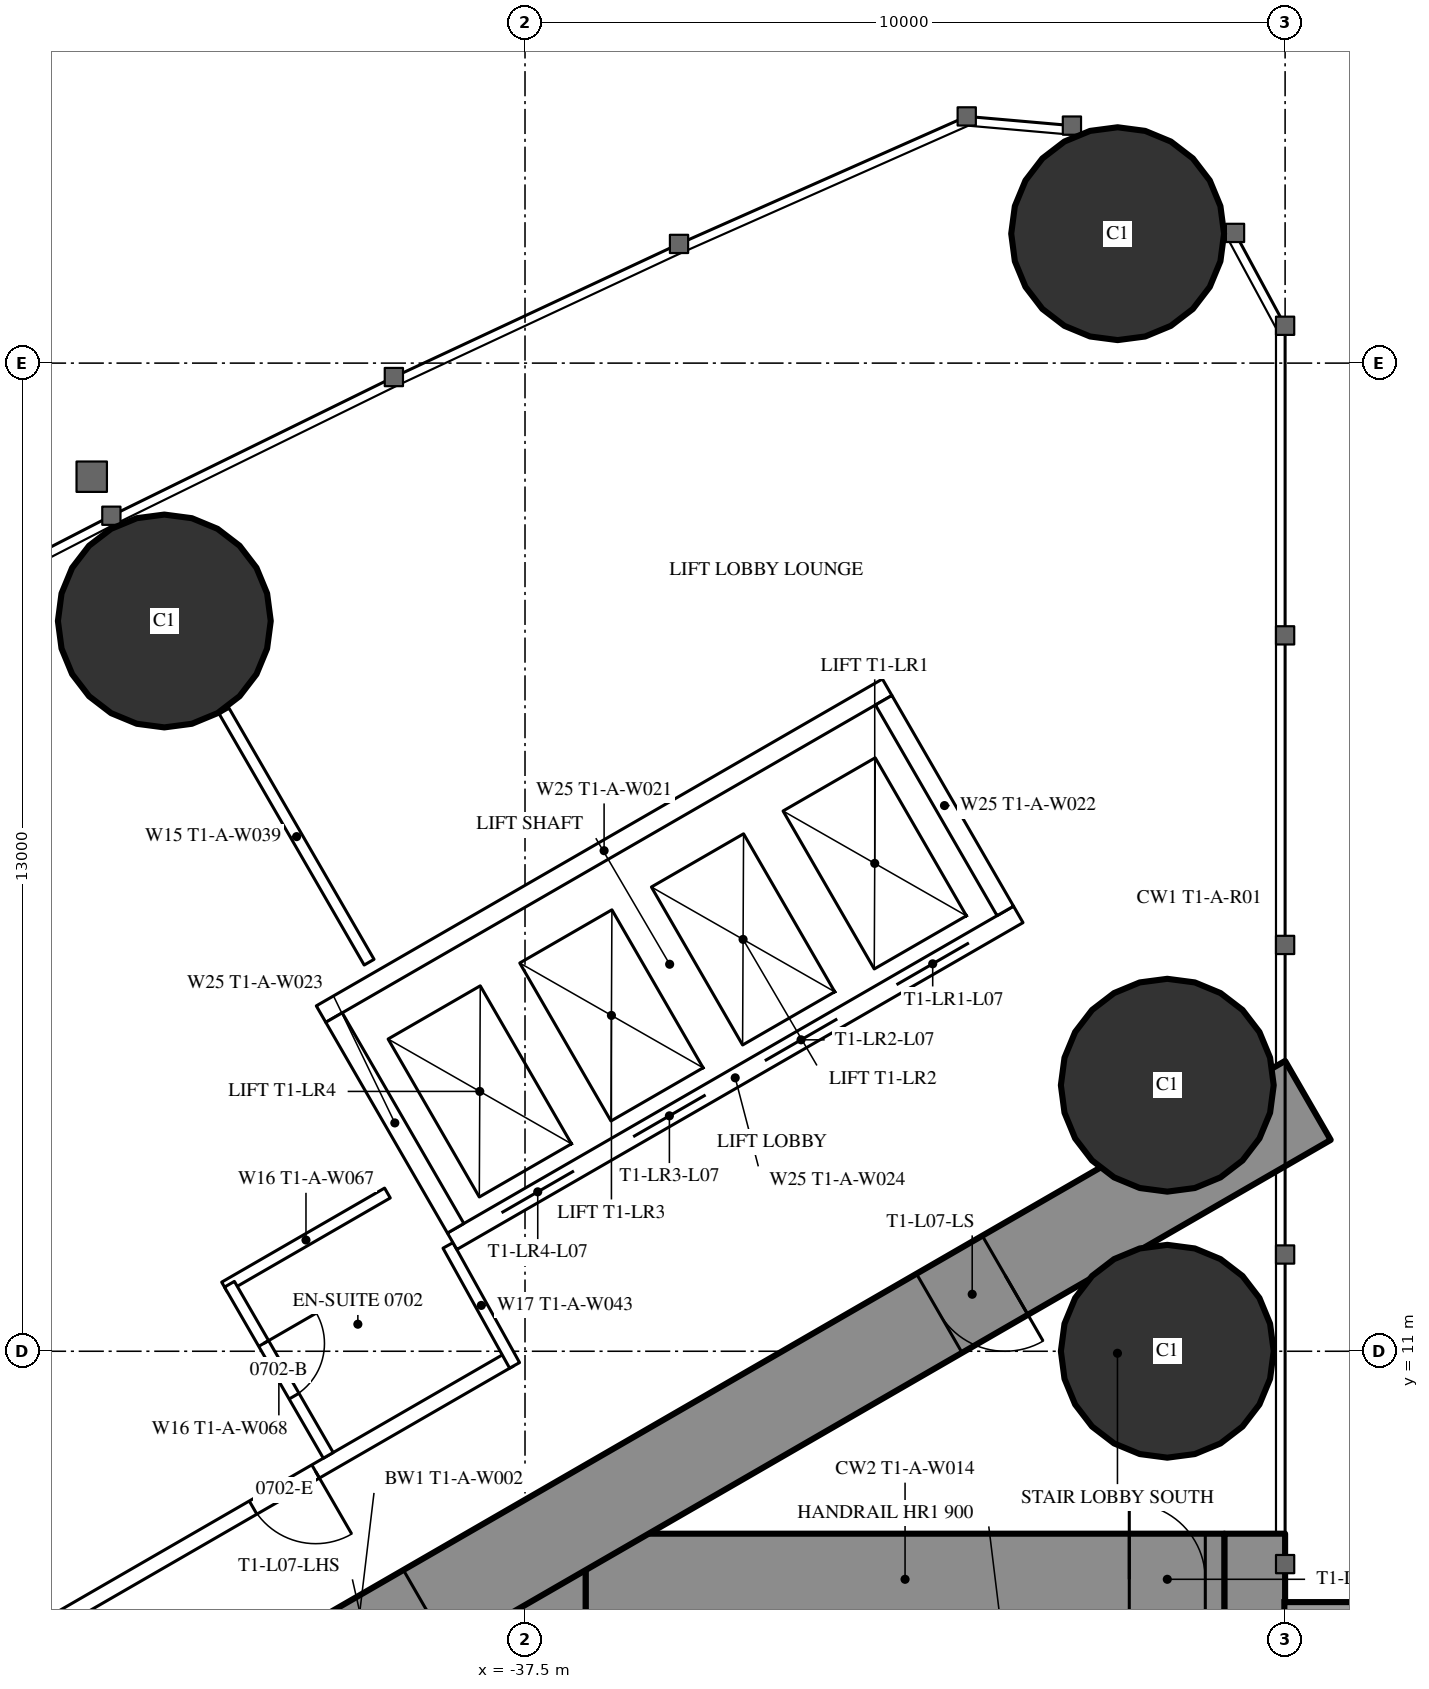
"""IFC4 building model, lengths in metres.
Left out: names, types, materials, properties, quantities, classifications, styles, units other than length and angle.
Written with IfcOpenShell. Run it as: python <this file> out.ifc"""

import sys

from ifc_helpers import new_model, si_unit, direction, frame, frame_2d, origin, origin_2d, place, context, subcontext, project, spatial, rectangle, hollow_circle, extrude, element, fill, save


model = new_model("IFC4")
c1 = context("Model", 3, precision=1e-05, world=origin(), true_north=direction((0.0, 1.0)))
c2 = subcontext(c1, "Body", "Model", "MODEL_VIEW")
j1 = project(units=[si_unit("LENGTHUNIT", "METRE"), si_unit("PLANEANGLEUNIT", "RADIAN")], contexts=[c1])
p1 = place(None, origin())
s1 = spatial("IfcSite", under=j1, at=p1, CompositionType="ELEMENT")
p2 = place(p1, origin())
s2 = spatial("IfcBuilding", under=s1, at=p2, CompositionType="ELEMENT")
p3 = place(p2, frame((0.0, 0.0, 32.0)))
s3 = spatial("IfcBuildingStorey", under=s2, at=p3, CompositionType="ELEMENT", Elevation=32.0)
for number, where, z_axis, x_axis in (
    (1, (-29.703, 25.703, 0.0), (0.0, 0.0, 1.0), (1.0, 0.0, 0.0)),
    (2, (-29.05, 11.0, 0.0), (0.0, 0.0, 1.0), (1.0, 0.0, 0.0)),
    (3, (-29.05, 14.5, 0.0), (0.0, 0.0, 1.0), (1.0, 0.0, 0.0)),
    (4, (-42.245, 20.607, 0.0), (0.0, 0.0, 1.0), (1.0, 0.0, 0.0)),
):
    element("IfcColumn", number, at=place(p3, frame(where, z_axis=z_axis, x_axis=x_axis)), inside=s3, PredefinedType="COLUMN", context=c2, shape_type="SweptSolid", body=[
        extrude(hollow_circle(Radius=1.4, WallThickness=0.12, at=origin_2d()), origin(), (0.0, 0.0, 1.0), 3.5),
    ])
p4 = place(p3, frame((-27.9, 8.6, 0.0), z_axis=(0.0, 0.0, 1.0), x_axis=(0.0, -1.0, 0.0)))
e5 = element("IfcWall", 5, at=p4, inside=s3, PredefinedType="SHEAR", context=c2, shape_type="SweptSolid", body=[
    extrude(rectangle(XDim=17.2, YDim=0.8, at=frame_2d((8.6, 0.0))), origin(), (0.0, 0.0, 1.0), 3.5),
])
p5 = place(p4, frame((2.45, 0.0, 0.6)))
e6 = element("IfcOpeningElement", 6, at=p5, cuts=e5, PredefinedType="OPENING", context=c2, shape_type="SweptSolid", body=[
    extrude(rectangle(XDim=0.6, YDim=2.1, at=frame_2d((0.3, 1.05))), frame((0.0, 0.41, 0.0), z_axis=(0.0, -1.0, 0.0), x_axis=(1.0, 0.0, 0.0)), (0.0, 0.0, 1.0), 0.82),
])
p6 = place(p4, frame((14.15, 0.0, 0.6)))
e7 = element("IfcOpeningElement", 7, at=p6, cuts=e5, PredefinedType="OPENING", context=c2, shape_type="SweptSolid", body=[
    extrude(rectangle(XDim=0.6, YDim=2.1, at=frame_2d((0.3, 1.05))), frame((0.0, 0.41, 0.0), z_axis=(0.0, -1.0, 0.0), x_axis=(1.0, 0.0, 0.0)), (0.0, 0.0, 1.0), 0.82),
])
p7 = place(p3, frame((-37.3, 8.6, 0.0), z_axis=(0.0, 0.0, 1.0), x_axis=(0.0, -1.0, 0.0)))
e8 = element("IfcWall", 8, at=p7, inside=s3, PredefinedType="SHEAR", context=c2, shape_type="SweptSolid", body=[
    extrude(rectangle(XDim=17.2, YDim=1.2, at=frame_2d((8.6, 0.0))), origin(), (0.0, 0.0, 1.0), 3.5),
])
p8 = place(p7, frame((7.7, 0.0, 0.0)))
e9 = element("IfcOpeningElement", 9, at=p8, cuts=e8, PredefinedType="OPENING", context=c2, shape_type="SweptSolid", body=[
    extrude(rectangle(XDim=1.8, YDim=2.2, at=frame_2d((0.9, 1.1))), frame((0.0, 0.61, 0.0), z_axis=(0.0, -1.0, 0.0), x_axis=(1.0, 0.0, 0.0)), (0.0, 0.0, 1.0), 1.22),
])
p9 = place(p3, frame((-28.3, 8.0, 0.0), z_axis=(0.0, 0.0, 1.0), x_axis=(-1.0, 0.0, 0.0)))
e10 = element("IfcWall", 10, at=p9, inside=s3, PredefinedType="SHEAR", context=c2, shape_type="SweptSolid", body=[
    extrude(rectangle(XDim=8.4, YDim=1.2, at=frame_2d((4.2, 0.0))), origin(), (0.0, 0.0, 1.0), 3.5),
])
p10 = place(p9, frame((0.25, 0.0, 0.0)))
e11 = element("IfcOpeningElement", 11, at=p10, cuts=e10, PredefinedType="OPENING", context=c2, shape_type="SweptSolid", body=[
    extrude(rectangle(XDim=1.0, YDim=2.2, at=frame_2d((0.5, 1.1))), frame((0.0, 0.61, 0.0), z_axis=(0.0, -1.0, 0.0), x_axis=(1.0, 0.0, 0.0)), (0.0, 0.0, 1.0), 1.22),
])
p11 = place(p3, frame((-27.2, 14.3, 0.0), z_axis=(0.0, 0.0, 1.0), x_axis=(-0.866026593062, -0.499997940104, 0.0)))
e12 = element("IfcWall", 12, at=p11, inside=s3, PredefinedType="SHEAR", context=c2, shape_type="SweptSolid", body=[
    extrude(rectangle(XDim=28.946, YDim=1.2, at=frame_2d((14.473, 0.0))), origin(), (0.0, 0.0, 1.0), 3.5),
])
p12 = place(p11, frame((4.6, 0.0, 0.0)))
e13 = element("IfcOpeningElement", 13, at=p12, cuts=e12, PredefinedType="OPENING", context=c2, shape_type="SweptSolid", body=[
    extrude(rectangle(XDim=1.0, YDim=2.2, at=frame_2d((0.5, 1.1))), frame((0.0, 0.61, 0.0), z_axis=(0.0, -1.0, 0.0), x_axis=(1.0, 0.0, 0.0)), (0.0, 0.0, 1.0), 1.22),
])
p13 = place(p11, frame((13.395, 0.0, 0.0)))
e14 = element("IfcOpeningElement", 14, at=p13, cuts=e12, PredefinedType="OPENING", context=c2, shape_type="SweptSolid", body=[
    extrude(rectangle(XDim=1.8, YDim=2.2, at=frame_2d((0.9, 1.1))), frame((0.0, 0.61, 0.0), z_axis=(0.0, -1.0, 0.0), x_axis=(1.0, 0.0, 0.0)), (0.0, 0.0, 1.0), 1.22),
])
p14 = place(p3, frame((-39.551, 16.119, 0.0), z_axis=(0.0, 0.0, 1.0), x_axis=(-0.500014214979, 0.866017196607, 0.0)))
e15 = element("IfcWall", 15, at=p14, inside=s3, PredefinedType="PARTITIONING", context=c2, shape_type="SweptSolid", body=[
    extrude(rectangle(XDim=3.815, YDim=0.15, at=frame_2d((1.907, 0.0))), origin(), (0.0, 0.0, 1.0), 3.25),
])
p15 = place(p3, frame((-37.7, 10.894, 0.0), z_axis=(0.0, 0.0, 1.0), x_axis=(-0.866027905338, -0.499995667157, 0.0)))
e16 = element("IfcWall", 16, at=p15, inside=s3, PredefinedType="PARTITIONING", context=c2, shape_type="SweptSolid", body=[
    extrude(rectangle(XDim=21.787, YDim=0.2, at=frame_2d((10.894, 0.0))), origin(), (0.0, 0.0, 1.0), 3.25),
])
p16 = place(p15, frame((16.008, 0.0, 0.0)))
e17 = element("IfcOpeningElement", 17, at=p16, cuts=e16, PredefinedType="OPENING", context=c2, shape_type="SweptSolid", body=[
    extrude(rectangle(XDim=0.95, YDim=2.2, at=frame_2d((0.475, 1.1))), frame((0.0, 0.11, 0.0), z_axis=(0.0, -1.0, 0.0), x_axis=(1.0, 0.0, 0.0)), (0.0, 0.0, 1.0), 0.22),
])
p17 = place(p15, frame((20.058, 0.0, 0.0)))
e18 = element("IfcOpeningElement", 18, at=p17, cuts=e16, PredefinedType="OPENING", context=c2, shape_type="SweptSolid", body=[
    extrude(rectangle(XDim=0.95, YDim=2.2, at=frame_2d((0.475, 1.1))), frame((0.0, 0.11, 0.0), z_axis=(0.0, -1.0, 0.0), x_axis=(1.0, 0.0, 0.0)), (0.0, 0.0, 1.0), 0.22),
])
p18 = place(p15, frame((2.95, 0.0, 0.0)))
e19 = element("IfcOpeningElement", 19, at=p18, cuts=e16, PredefinedType="OPENING", context=c2, shape_type="SweptSolid", body=[
    extrude(rectangle(XDim=0.95, YDim=2.2, at=frame_2d((0.475, 1.1))), frame((0.0, 0.11, 0.0), z_axis=(0.0, -1.0, 0.0), x_axis=(1.0, 0.0, 0.0)), (0.0, 0.0, 1.0), 0.22),
])
p19 = place(p3, frame((-38.513, 12.392, 0.0), z_axis=(0.0, 0.0, 1.0), x_axis=(0.485585508183, -0.874189175317, 0.0)))
e20 = element("IfcWall", 20, at=p19, inside=s3, PredefinedType="PARTITIONING", context=c2, shape_type="SweptSolid", body=[
    extrude(rectangle(XDim=1.805, YDim=0.15, at=frame_2d((0.902, 0.0))), origin(), (0.0, 0.0, 1.0), 3.25),
])
p20 = place(p3, frame((-39.31, 13.082, 0.0), z_axis=(0.0, 0.0, 1.0), x_axis=(-0.866031185235, -0.4999899861, 0.0)))
e21 = element("IfcWall", 21, at=p20, inside=s3, PredefinedType="PARTITIONING", context=c2, shape_type="SweptSolid", body=[
    extrude(rectangle(XDim=2.475, YDim=0.15, at=frame_2d((1.238, 0.0))), origin(), (0.0, 0.0, 1.0), 3.25),
])
p21 = place(p3, frame((-40.088, 9.63, 0.0), z_axis=(0.0, 0.0, 1.0), x_axis=(-0.500006934395, 0.866021400173, 0.0)))
e22 = element("IfcWall", 22, at=p21, inside=s3, PredefinedType="PARTITIONING", context=c2, shape_type="SweptSolid", body=[
    extrude(rectangle(XDim=2.6, YDim=0.15, at=frame_2d((1.3, 0.0))), origin(), (0.0, 0.0, 1.0), 3.25),
])
p22 = place(p21, frame((0.9, 0.0, 0.0)))
e23 = element("IfcOpeningElement", 23, at=p22, cuts=e22, PredefinedType="OPENING", context=c2, shape_type="SweptSolid", body=[
    extrude(rectangle(XDim=0.8, YDim=2.2, at=frame_2d((0.4, 1.1))), frame((0.0, 0.085, 0.0), z_axis=(0.0, -1.0, 0.0), x_axis=(1.0, 0.0, 0.0)), (0.0, 0.0, 1.0), 0.17),
])
p23 = place(p3, frame((-31.01, 16.747, 0.0), z_axis=(0.0, 0.0, 1.0), x_axis=(-0.866028165386, -0.499995216735, 0.0)))
e24 = element("IfcWall", 24, at=p23, inside=s3, PredefinedType="PARTITIONING", context=c2, shape_type="SweptSolid", body=[
    extrude(rectangle(XDim=8.6, YDim=0.25, at=frame_2d((4.3, 0.0))), origin(), (0.0, 0.0, 1.0), 3.25),
])
p24 = place(p23, frame((0.75, 0.0, 0.0)))
e25 = element("IfcOpeningElement", 25, at=p24, cuts=e24, PredefinedType="OPENING", context=c2, shape_type="SweptSolid", body=[
    extrude(rectangle(XDim=1.1, YDim=2.2, at=frame_2d((0.55, 1.1))), frame((0.0, 0.135, 0.0), z_axis=(0.0, -1.0, 0.0), x_axis=(1.0, 0.0, 0.0)), (0.0, 0.0, 1.0), 0.27),
])
p25 = place(p23, frame((2.75, 0.0, 0.0)))
e26 = element("IfcOpeningElement", 26, at=p25, cuts=e24, PredefinedType="OPENING", context=c2, shape_type="SweptSolid", body=[
    extrude(rectangle(XDim=1.1, YDim=2.2, at=frame_2d((0.55, 1.1))), frame((0.0, 0.135, 0.0), z_axis=(0.0, -1.0, 0.0), x_axis=(1.0, 0.0, 0.0)), (0.0, 0.0, 1.0), 0.27),
])
p26 = place(p23, frame((4.75, 0.0, 0.0)))
e27 = element("IfcOpeningElement", 27, at=p26, cuts=e24, PredefinedType="OPENING", context=c2, shape_type="SweptSolid", body=[
    extrude(rectangle(XDim=1.1, YDim=2.2, at=frame_2d((0.55, 1.1))), frame((0.0, 0.135, 0.0), z_axis=(0.0, -1.0, 0.0), x_axis=(1.0, 0.0, 0.0)), (0.0, 0.0, 1.0), 0.27),
])
p27 = place(p23, frame((6.75, 0.0, 0.0)))
e28 = element("IfcOpeningElement", 28, at=p27, cuts=e24, PredefinedType="OPENING", context=c2, shape_type="SweptSolid", body=[
    extrude(rectangle(XDim=1.1, YDim=2.2, at=frame_2d((0.55, 1.1))), frame((0.0, 0.135, 0.0), z_axis=(0.0, -1.0, 0.0), x_axis=(1.0, 0.0, 0.0)), (0.0, 0.0, 1.0), 0.27),
])
p28 = place(p3, frame((-32.736, 19.736, 0.0), z_axis=(0.0, 0.0, 1.0), x_axis=(-0.866028165386, -0.499995216735, 0.0)))
e29 = element("IfcWall", 29, at=p28, inside=s3, PredefinedType="PARTITIONING", context=c2, shape_type="SweptSolid", body=[
    extrude(rectangle(XDim=8.6, YDim=0.25, at=frame_2d((4.3, 0.0))), origin(), (0.0, 0.0, 1.0), 3.25),
])
p29 = place(p3, frame((-31.181, 16.793, 0.0), z_axis=(0.0, 0.0, 1.0), x_axis=(-0.499929347863, 0.866066190972, 0.0)))
e30 = element("IfcWall", 30, at=p29, inside=s3, PredefinedType="PARTITIONING", context=c2, shape_type="SweptSolid", body=[
    extrude(rectangle(XDim=3.201, YDim=0.25, at=frame_2d((1.6, 0.0))), origin(), (0.0, 0.0, 1.0), 3.25),
])
p30 = place(p3, frame((-38.413, 12.618, 0.0), z_axis=(0.0, 0.0, 1.0), x_axis=(-0.499872130319, 0.866099216793, 0.0)))
e31 = element("IfcWall", 31, at=p30, inside=s3, PredefinedType="PARTITIONING", context=c2, shape_type="SweptSolid", body=[
    extrude(rectangle(XDim=3.2, YDim=0.25, at=frame_2d((1.6, 0.0))), origin(), (0.0, 0.0, 1.0), 3.25),
])
p31 = place(p22, origin())
e32 = element("IfcDoor", 32, at=p31, inside=s3, OperationType="SINGLE_SWING_RIGHT", PredefinedType="DOOR", context=c2, shape_type="SweptSolid", body=[
    extrude(rectangle(XDim=0.8, YDim=2.2, at=frame_2d((0.4, 1.1))), frame((0.0, 0.025, 0.0), z_axis=(0.0, -1.0, 0.0), x_axis=(1.0, 0.0, 0.0)), (0.0, 0.0, 1.0), 0.05),
])
fill(e23, e32)
p32 = place(p18, origin())
e33 = element("IfcDoor", 33, at=p32, inside=s3, OperationType="SINGLE_SWING_LEFT", PredefinedType="DOOR", context=c2, shape_type="SweptSolid", body=[
    extrude(rectangle(XDim=0.95, YDim=2.2, at=frame_2d((0.475, 1.1))), frame((0.0, 0.025, 0.0), z_axis=(0.0, -1.0, 0.0), x_axis=(1.0, 0.0, 0.0)), (0.0, 0.0, 1.0), 0.05),
])
fill(e19, e33)
p33 = place(p12, origin())
e34 = element("IfcDoor", 34, at=p33, inside=s3, OperationType="SINGLE_SWING_LEFT", PredefinedType="DOOR", context=c2, shape_type="SweptSolid", body=[
    extrude(rectangle(XDim=1.0, YDim=2.2, at=frame_2d((0.5, 1.1))), frame((0.0, 0.025, 0.0), z_axis=(0.0, -1.0, 0.0), x_axis=(1.0, 0.0, 0.0)), (0.0, 0.0, 1.0), 0.05),
])
fill(e13, e34)
p34 = place(p13, origin())
e35 = element("IfcDoor", 35, at=p34, inside=s3, OperationType="DOUBLE_DOOR_SINGLE_SWING", PredefinedType="DOOR", context=c2, shape_type="SweptSolid", body=[
    extrude(rectangle(XDim=1.8, YDim=2.2, at=frame_2d((0.9, 1.1))), frame((0.0, 0.025, 0.0), z_axis=(0.0, -1.0, 0.0), x_axis=(1.0, 0.0, 0.0)), (0.0, 0.0, 1.0), 0.05),
])
fill(e14, e35)
p35 = place(p10, origin())
e36 = element("IfcDoor", 36, at=p35, inside=s3, OperationType="SINGLE_SWING_RIGHT", PredefinedType="DOOR", context=c2, shape_type="SweptSolid", body=[
    extrude(rectangle(XDim=1.0, YDim=2.2, at=frame_2d((0.5, 1.1))), frame((0.0, 0.025, 0.0), z_axis=(0.0, -1.0, 0.0), x_axis=(1.0, 0.0, 0.0)), (0.0, 0.0, 1.0), 0.05),
])
fill(e11, e36)
p36 = place(p24, origin())
e37 = element("IfcDoor", 37, at=p36, inside=s3, OperationType="DOUBLE_DOOR_SLIDING", PredefinedType="USERDEFINED", context=c2, shape_type="SweptSolid", body=[
    extrude(rectangle(XDim=1.1, YDim=2.2, at=frame_2d((0.55, 1.1))), frame((0.0, 0.025, 0.0), z_axis=(0.0, -1.0, 0.0), x_axis=(1.0, 0.0, 0.0)), (0.0, 0.0, 1.0), 0.05),
])
fill(e25, e37)
p37 = place(p25, origin())
e38 = element("IfcDoor", 38, at=p37, inside=s3, OperationType="DOUBLE_DOOR_SLIDING", PredefinedType="USERDEFINED", context=c2, shape_type="SweptSolid", body=[
    extrude(rectangle(XDim=1.1, YDim=2.2, at=frame_2d((0.55, 1.1))), frame((0.0, 0.025, 0.0), z_axis=(0.0, -1.0, 0.0), x_axis=(1.0, 0.0, 0.0)), (0.0, 0.0, 1.0), 0.05),
])
fill(e26, e38)
p38 = place(p26, origin())
e39 = element("IfcDoor", 39, at=p38, inside=s3, OperationType="DOUBLE_DOOR_SLIDING", PredefinedType="USERDEFINED", context=c2, shape_type="SweptSolid", body=[
    extrude(rectangle(XDim=1.1, YDim=2.2, at=frame_2d((0.55, 1.1))), frame((0.0, 0.025, 0.0), z_axis=(0.0, -1.0, 0.0), x_axis=(1.0, 0.0, 0.0)), (0.0, 0.0, 1.0), 0.05),
])
fill(e27, e39)
p39 = place(p27, origin())
e40 = element("IfcDoor", 40, at=p39, inside=s3, OperationType="DOUBLE_DOOR_SLIDING", PredefinedType="USERDEFINED", context=c2, shape_type="SweptSolid", body=[
    extrude(rectangle(XDim=1.1, YDim=2.2, at=frame_2d((0.55, 1.1))), frame((0.0, 0.025, 0.0), z_axis=(0.0, -1.0, 0.0), x_axis=(1.0, 0.0, 0.0)), (0.0, 0.0, 1.0), 0.05),
])
fill(e28, e40)
save(model, sys.argv[1])
